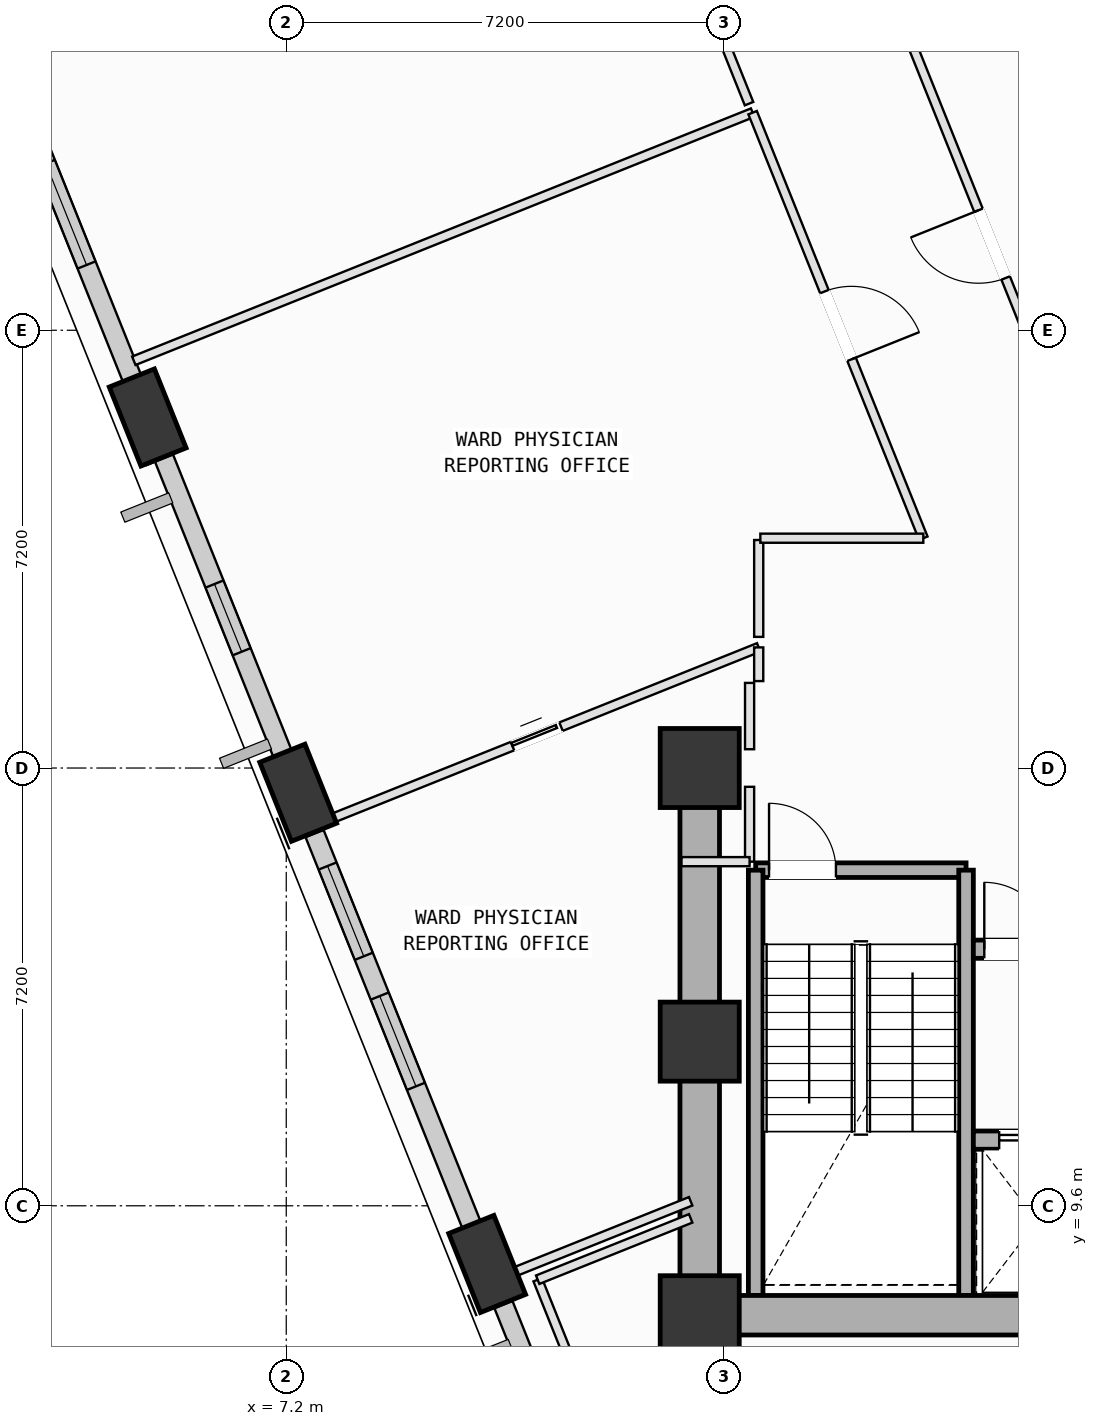
"""IFC4 building model, lengths in metres.
Left out: names, types, materials, properties, quantities, classifications, styles, units other than length and angle.
Written with IfcOpenShell. Run it as: python <this file> out.ifc"""

import sys

from ifc_helpers import new_model, si_unit, direction, frame, frame_2d, origin, origin_2d, place, context, subcontext, project, spatial, rectangle, extrude, element, fill, save


model = new_model("IFC4")
c1 = context("Model", 3, precision=1e-05, world=origin(), true_north=direction((0.0, 1.0)))
c2 = subcontext(c1, "Body", "Model", "MODEL_VIEW")
j1 = project(units=[si_unit("LENGTHUNIT", "METRE"), si_unit("PLANEANGLEUNIT", "RADIAN")], contexts=[c1])
p1 = place(None, origin())
s1 = spatial("IfcSite", under=j1, at=p1, CompositionType="ELEMENT")
p2 = place(p1, origin())
s2 = spatial("IfcBuilding", under=s1, at=p2, CompositionType="ELEMENT")
p3 = place(p2, frame((0.0, 0.0, 116.4)))
s3 = spatial("IfcBuildingStorey", under=s2, at=p3, CompositionType="ELEMENT", Elevation=116.4)
for number, where, z_axis, x_axis in (
    (1, (14.0, 7.8, 0.0), (0.0, 0.0, 1.0), (1.0, 0.0, 0.0)),
    (2, (14.0, 12.3, 0.0), (0.0, 0.0, 1.0), (1.0, 0.0, 0.0)),
    (3, (14.0, 16.8, 0.0), (0.0, 0.0, 1.0), (1.0, 0.0, 0.0)),
):
    element("IfcColumn", number, at=place(p3, frame(where, z_axis=z_axis, x_axis=x_axis)), inside=s3, PredefinedType="COLUMN", context=c2, shape_type="SweptSolid", body=[
        extrude(rectangle(XDim=1.3, YDim=1.3, at=origin_2d()), origin(), (0.0, 0.0, 1.0), 4.0),
    ])
p4 = place(p3, frame((4.921, 22.566, 0.002), z_axis=(0.010191079334, -0.117986007762, 0.992962961985), x_axis=(-0.450108088675, 0.886183267608, 0.109917808931)))
e4 = element("IfcColumn", 4, at=p4, inside=s3, PredefinedType="COLUMN", context=c2, shape_type="SweptSolid", body=[
    extrude(rectangle(XDim=1.4, YDim=0.8, at=origin_2d()), origin(), (0.0, 0.0, 1.0), 4.025),
])
p5 = place(p3, frame((7.396, 16.394, 0.002), z_axis=(0.035507833365, -0.107676745966, 0.993551665565), x_axis=(-0.642258011043, 0.759230004832, 0.105235198548)))
e5 = element("IfcColumn", 5, at=p5, inside=s3, PredefinedType="COLUMN", context=c2, shape_type="SweptSolid", body=[
    extrude(rectangle(XDim=1.4, YDim=0.8, at=origin_2d()), origin(), (0.0, 0.0, 1.0), 4.022),
])
p6 = place(p3, frame((10.504, 8.643, 0.002), z_axis=(0.067292325848, -0.094536919452, 0.993244438063), x_axis=(-0.837814695487, 0.535225411219, 0.107704666624)))
e6 = element("IfcColumn", 6, at=p6, inside=s3, PredefinedType="COLUMN", context=c2, shape_type="SweptSolid", body=[
    extrude(rectangle(XDim=1.4, YDim=0.8, at=origin_2d()), origin(), (0.0, 0.0, 1.0), 4.023),
])
p7 = place(p3, frame((4.823, 22.81, 0.0), z_axis=(0.0, 0.0, 1.0), x_axis=(-0.372175910941, 0.928162211747, 0.0)))
e7 = element("IfcWall", 7, at=p7, inside=s3, PredefinedType="SOLIDWALL", context=c2, shape_type="SweptSolid", body=[
    extrude(rectangle(XDim=5.628, YDim=0.32, at=frame_2d((2.814, 0.0))), origin(), (0.0, 0.0, 1.0), 3.165),
])
p8 = place(p7, frame((2.438, 0.0, 0.75)))
e8 = element("IfcOpeningElement", 8, at=p8, cuts=e7, PredefinedType="OPENING", context=c2, shape_type="SweptSolid", body=[
    extrude(rectangle(XDim=1.8, YDim=2.05, at=frame_2d((0.9, 1.025))), frame((0.0, 0.17, 0.0), z_axis=(0.0, -1.0, 0.0), x_axis=(1.0, 0.0, 0.0)), (0.0, 0.0, 1.0), 0.34),
])
p9 = place(p3, frame((7.296, 16.643, 0.0), z_axis=(0.0, 0.0, 1.0), x_axis=(-0.372178527246, 0.928161162653, 0.0)))
e9 = element("IfcWall", 9, at=p9, inside=s3, PredefinedType="SOLIDWALL", context=c2, shape_type="SweptSolid", body=[
    extrude(rectangle(XDim=5.662, YDim=0.32, at=frame_2d((2.831, 0.0))), origin(), (0.0, 0.0, 1.0), 3.165),
])
p10 = place(p9, frame((2.23, 0.0, 0.75)))
e10 = element("IfcOpeningElement", 10, at=p10, cuts=e9, PredefinedType="OPENING", context=c2, shape_type="SweptSolid", body=[
    extrude(rectangle(XDim=1.2, YDim=1.75, at=frame_2d((0.6, 0.875))), frame((0.0, 0.17, 0.0), z_axis=(0.0, -1.0, 0.0), x_axis=(1.0, 0.0, 0.0)), (0.0, 0.0, 1.0), 0.34),
])
p11 = place(p3, frame((10.405, 8.89, 0.0), z_axis=(0.0, 0.0, 1.0), x_axis=(-0.372168327293, 0.928165252614, 0.0)))
e11 = element("IfcWall", 11, at=p11, inside=s3, PredefinedType="SOLIDWALL", context=c2, shape_type="SweptSolid", body=[
    extrude(rectangle(XDim=7.36, YDim=0.32, at=frame_2d((3.68, 0.0))), origin(), (0.0, 0.0, 1.0), 3.165),
])
p12 = place(p11, frame((2.881, 0.0, 0.75)))
e12 = element("IfcOpeningElement", 12, at=p12, cuts=e11, PredefinedType="OPENING", context=c2, shape_type="SweptSolid", body=[
    extrude(rectangle(XDim=1.6, YDim=1.95, at=frame_2d((0.8, 0.975))), frame((0.0, 0.17, 0.0), z_axis=(0.0, -1.0, 0.0), x_axis=(1.0, 0.0, 0.0)), (0.0, 0.0, 1.0), 0.34),
])
p13 = place(p11, frame((5.186, 0.0, 0.75)))
e13 = element("IfcOpeningElement", 13, at=p13, cuts=e11, PredefinedType="OPENING", context=c2, shape_type="SweptSolid", body=[
    extrude(rectangle(XDim=1.6, YDim=1.95, at=frame_2d((0.8, 0.975))), frame((0.0, 0.17, 0.0), z_axis=(0.0, -1.0, 0.0), x_axis=(1.0, 0.0, 0.0)), (0.0, 0.0, 1.0), 0.34),
])
p14 = place(p3, frame((13.088, 2.198, 0.0), z_axis=(0.0, 0.0, 1.0), x_axis=(-0.372168368357, 0.928165236148, 0.0)))
e14 = element("IfcWall", 14, at=p14, inside=s3, PredefinedType="SOLIDWALL", context=c2, shape_type="SweptSolid", body=[
    extrude(rectangle(XDim=6.223, YDim=0.32, at=frame_2d((3.112, 0.0))), origin(), (0.0, 0.0, 1.0), 3.165),
])
p15 = place(p14, frame((2.114, 0.0, 0.75)))
e15 = element("IfcOpeningElement", 15, at=p15, cuts=e14, PredefinedType="OPENING", context=c2, shape_type="SweptSolid", body=[
    extrude(rectangle(XDim=2.0, YDim=1.95, at=frame_2d((1.0, 0.975))), frame((0.0, 0.17, 0.0), z_axis=(0.0, -1.0, 0.0), x_axis=(1.0, 0.0, 0.0)), (0.0, 0.0, 1.0), 0.34),
])
p16 = place(p3, frame((14.92, 15.12, 0.0), z_axis=(0.0, 0.0, 1.0), x_axis=(1.0, 0.0, 0.0)))
e16 = element("IfcWall", 16, at=p16, inside=s3, PredefinedType="SOLIDWALL", context=c2, shape_type="SweptSolid", body=[
    extrude(rectangle(XDim=3.46, YDim=0.24, at=frame_2d((1.73, 0.0))), origin(), (0.0, 0.0, 1.0), 3.78),
])
p17 = place(p16, frame((0.22, 0.0, 0.0)))
e17 = element("IfcOpeningElement", 17, at=p17, cuts=e16, PredefinedType="OPENING", context=c2, shape_type="SweptSolid", body=[
    extrude(rectangle(XDim=1.1, YDim=2.15, at=frame_2d((0.55, 1.075))), frame((0.0, 0.13, 0.0), z_axis=(0.0, -1.0, 0.0), x_axis=(1.0, 0.0, 0.0)), (0.0, 0.0, 1.0), 0.26),
])
for number, where, z_axis, x_axis in (
    (18, (18.38, 15.12, 0.0), (0.0, 0.0, 1.0), (0.0, -1.0, 0.0)),
    (19, (14.92, 8.125, 0.0), (0.0, 0.0, 1.0), (0.0, 1.0, 0.0)),
):
    element("IfcWall", number, at=place(p3, frame(where, z_axis=z_axis, x_axis=x_axis)), inside=s3, PredefinedType="SOLIDWALL", context=c2, shape_type="SweptSolid", body=[
        extrude(rectangle(XDim=6.995, YDim=0.24, at=frame_2d((3.498, 0.0))), origin(), (0.0, 0.0, 1.0), 3.78),
    ])
p18 = place(p3, frame((14.0, 7.8, 0.0), z_axis=(0.0, 0.0, 1.0), x_axis=(1.0, 0.0, 0.0)))
e20 = element("IfcWall", 20, at=p18, inside=s3, PredefinedType="SHEAR", context=c2, shape_type="SweptSolid", body=[
    extrude(rectangle(XDim=10.8, YDim=0.65, at=frame_2d((5.4, 0.0))), origin(), (0.0, 0.0, 1.0), 3.78),
])
p19 = place(p3, frame((14.0, 16.8, 0.0), z_axis=(0.0, 0.0, 1.0), x_axis=(0.0, -1.0, 0.0)))
e21 = element("IfcWall", 21, at=p19, inside=s3, PredefinedType="SHEAR", context=c2, shape_type="SweptSolid", body=[
    extrude(rectangle(XDim=9.0, YDim=0.65, at=frame_2d((4.5, 0.0))), origin(), (0.0, 0.0, 1.0), 3.78),
])
p20 = place(p3, frame((18.5, 10.68, 0.0), z_axis=(0.0, 0.0, 1.0), x_axis=(1.0, 0.0, 0.0)))
e22 = element("IfcWall", 22, at=p20, inside=s3, PredefinedType="SOLIDWALL", context=c2, shape_type="SweptSolid", body=[
    extrude(rectangle(XDim=5.3, YDim=0.3, at=frame_2d((2.65, 0.0))), origin(), (0.0, 0.0, 1.0), 3.78),
])
p21 = place(p20, frame((4.22, 0.0, 0.0)))
e23 = element("IfcOpeningElement", 23, at=p21, cuts=e22, PredefinedType="OPENING", context=c2, shape_type="SweptSolid", body=[
    extrude(rectangle(XDim=0.86, YDim=2.06, at=frame_2d((0.43, 1.03))), frame((0.0, 0.16, 0.0), z_axis=(0.0, -1.0, 0.0), x_axis=(1.0, 0.0, 0.0)), (0.0, 0.0, 1.0), 0.32),
])
p22 = place(p20, frame((0.425, 0.0, 0.0)))
e24 = element("IfcOpeningElement", 24, at=p22, cuts=e22, PredefinedType="OPENING", context=c2, shape_type="SweptSolid", body=[
    extrude(rectangle(XDim=1.25, YDim=2.18, at=frame_2d((0.625, 1.09))), frame((0.0, 0.16, 0.0), z_axis=(0.0, -1.0, 0.0), x_axis=(1.0, 0.0, 0.0)), (0.0, 0.0, 1.0), 0.32),
])
p23 = place(p20, frame((2.525, 0.0, 0.0)))
e25 = element("IfcOpeningElement", 25, at=p23, cuts=e22, PredefinedType="OPENING", context=c2, shape_type="SweptSolid", body=[
    extrude(rectangle(XDim=1.25, YDim=2.18, at=frame_2d((0.625, 1.09))), frame((0.0, 0.16, 0.0), z_axis=(0.0, -1.0, 0.0), x_axis=(1.0, 0.0, 0.0)), (0.0, 0.0, 1.0), 0.32),
])
p24 = place(p3, frame((18.5, 13.82, 0.0), z_axis=(0.0, 0.0, 1.0), x_axis=(1.0, 0.0, 0.0)))
e26 = element("IfcWall", 26, at=p24, inside=s3, PredefinedType="SOLIDWALL", context=c2, shape_type="SweptSolid", body=[
    extrude(rectangle(XDim=5.3, YDim=0.3, at=frame_2d((2.65, 0.0))), origin(), (0.0, 0.0, 1.0), 3.78),
])
p25 = place(p24, frame((0.18, 0.0, 0.0)))
e27 = element("IfcOpeningElement", 27, at=p25, cuts=e26, PredefinedType="OPENING", context=c2, shape_type="SweptSolid", body=[
    extrude(rectangle(XDim=1.1, YDim=2.15, at=frame_2d((0.55, 1.075))), frame((0.0, 0.16, 0.0), z_axis=(0.0, -1.0, 0.0), x_axis=(1.0, 0.0, 0.0)), (0.0, 0.0, 1.0), 0.32),
])
p26 = place(p3, frame((16.075, -3.435, 0.0), z_axis=(0.0, 0.0, 1.0), x_axis=(-0.372226827059, 0.928141793703, 0.0)))
e28 = element("IfcWall", 28, at=p26, inside=s3, PredefinedType="PARTITIONING", context=c2, shape_type="SweptSolid", body=[
    extrude(rectangle(XDim=12.734, YDim=0.15, at=frame_2d((6.367, 0.0))), origin(), (0.0, 0.0, 1.0), 3.165),
])
p27 = place(p3, frame((11.335, 8.384, 0.0), z_axis=(0.0, 0.0, 1.0), x_axis=(0.928147145325, 0.372213482595, 0.0)))
e29 = element("IfcWall", 29, at=p27, inside=s3, PredefinedType="PARTITIONING", context=c2, shape_type="SweptSolid", body=[
    extrude(rectangle(XDim=2.711, YDim=0.15, at=frame_2d((1.355, 0.0))), origin(), (0.0, 0.0, 1.0), 3.78),
])
p28 = place(p3, frame((14.82, 18.2, 0.0), z_axis=(0.0, 0.0, 1.0), x_axis=(0.0, -1.0, 0.0)))
e30 = element("IfcWall", 30, at=p28, inside=s3, PredefinedType="PARTITIONING", context=c2, shape_type="SweptSolid", body=[
    extrude(rectangle(XDim=1.091, YDim=0.15, at=frame_2d((0.545, 0.0))), origin(), (0.0, 0.0, 1.0), 3.78),
])
p29 = place(p3, frame((14.82, 16.491, 0.0), z_axis=(0.0, 0.0, 1.0), x_axis=(0.0, -1.0, 0.0)))
e31 = element("IfcWall", 31, at=p29, inside=s3, PredefinedType="PARTITIONING", context=c2, shape_type="SweptSolid", body=[
    extrude(rectangle(XDim=1.231, YDim=0.15, at=frame_2d((0.615, 0.0))), origin(), (0.0, 0.0, 1.0), 3.78),
])
p30 = place(p3, frame((14.82, 15.26, 0.0), z_axis=(0.0, 0.0, 1.0), x_axis=(-1.0, 0.0, 0.0)))
e32 = element("IfcWall", 32, at=p30, inside=s3, PredefinedType="PARTITIONING", context=c2, shape_type="SweptSolid", body=[
    extrude(rectangle(XDim=1.12, YDim=0.15, at=frame_2d((0.56, 0.0))), origin(), (0.0, 0.0, 1.0), 3.78),
])
p31 = place(p3, frame((13.851, 9.674, 0.0), z_axis=(0.0, 0.0, 1.0), x_axis=(-0.928127817915, -0.372261673574, 0.0)))
e33 = element("IfcWall", 33, at=p31, inside=s3, PredefinedType="PARTITIONING", context=c2, shape_type="SweptSolid", body=[
    extrude(rectangle(XDim=3.72, YDim=0.15, at=frame_2d((1.86, 0.0))), origin(), (0.0, 0.0, 1.0), 3.78),
])
p32 = place(p3, frame((10.398, 8.289, 0.0), z_axis=(0.0, 0.0, 1.0), x_axis=(-0.372450597791, 0.928052020204, 0.0)))
e34 = element("IfcWall", 34, at=p32, inside=s3, PredefinedType="PARTITIONING", context=c2, shape_type="SweptSolid", body=[
    extrude(rectangle(XDim=0.556, YDim=0.15, at=frame_2d((0.278, 0.0))), origin(), (0.0, 0.0, 1.0), 3.165),
])
p33 = place(p3, frame((7.67, 15.857, 0.0), z_axis=(0.0, 0.0, 1.0), x_axis=(0.928170242588, 0.372155882358, 0.0)))
e35 = element("IfcWall", 35, at=p33, inside=s3, PredefinedType="PARTITIONING", context=c2, shape_type="SweptSolid", body=[
    extrude(rectangle(XDim=7.865, YDim=0.15, at=frame_2d((3.933, 0.0))), origin(), (0.0, 0.0, 1.0), 3.78),
])
p34 = place(p33, frame((3.502, 0.0, 0.0)))
e36 = element("IfcOpeningElement", 36, at=p34, cuts=e35, PredefinedType="OPENING", context=c2, shape_type="SweptSolid", body=[
    extrude(rectangle(XDim=0.86, YDim=2.06, at=frame_2d((0.43, 1.03))), frame((0.0, 0.085, 0.0), z_axis=(0.0, -1.0, 0.0), x_axis=(1.0, 0.0, 0.0)), (0.0, 0.0, 1.0), 0.17),
])
p35 = place(p3, frame((14.97, 18.784, 0.0), z_axis=(0.0, 0.0, 1.0), x_axis=(0.0, -1.0, 0.0)))
e37 = element("IfcWall", 37, at=p35, inside=s3, PredefinedType="PARTITIONING", context=c2, shape_type="SweptSolid", body=[
    extrude(rectangle(XDim=0.554, YDim=0.15, at=frame_2d((0.277, 0.0))), origin(), (0.0, 0.0, 1.0), 3.78),
])
p36 = place(p3, frame((14.97, 20.55, 0.0), z_axis=(0.0, 0.0, 1.0), x_axis=(0.0, -1.0, 0.0)))
e38 = element("IfcWall", 38, at=p36, inside=s3, PredefinedType="PARTITIONING", context=c2, shape_type="SweptSolid", body=[
    extrude(rectangle(XDim=1.593, YDim=0.15, at=frame_2d((0.796, 0.0))), origin(), (0.0, 0.0, 1.0), 3.78),
])
p37 = place(p3, frame((7.347, 15.9, 0.0), z_axis=(0.0, 0.0, 1.0), x_axis=(-0.372757689905, 0.927928717422, 0.0)))
e39 = element("IfcWall", 39, at=p37, inside=s3, PredefinedType="PARTITIONING", context=c2, shape_type="SweptSolid", body=[
    extrude(rectangle(XDim=0.708, YDim=0.15, at=frame_2d((0.354, 0.0))), origin(), (0.0, 0.0, 1.0), 3.165),
])
p38 = place(p3, frame((4.976, 21.812, 0.0), z_axis=(0.0, 0.0, 1.0), x_axis=(-0.372032450778, 0.928219723755, 0.0)))
e40 = element("IfcWall", 40, at=p38, inside=s3, PredefinedType="PARTITIONING", context=c2, shape_type="SweptSolid", body=[
    extrude(rectangle(XDim=0.984, YDim=0.15, at=frame_2d((0.492, 0.0))), origin(), (0.0, 0.0, 1.0), 3.165),
])
p39 = place(p3, frame((4.693, 23.498, 0.0), z_axis=(0.0, 0.0, 1.0), x_axis=(0.928153869295, 0.372196715344, 0.0)))
e41 = element("IfcWall", 41, at=p39, inside=s3, PredefinedType="PARTITIONING", context=c2, shape_type="SweptSolid", body=[
    extrude(rectangle(XDim=10.965, YDim=0.15, at=frame_2d((5.482, 0.0))), origin(), (0.0, 0.0, 1.0), 3.78),
])
p40 = place(p3, frame((14.87, 27.579, 0.0), z_axis=(0.0, 0.0, 1.0), x_axis=(0.372222245283, -0.928143631189, 0.0)))
e42 = element("IfcWall", 42, at=p40, inside=s3, PredefinedType="PARTITIONING", context=c2, shape_type="SweptSolid", body=[
    extrude(rectangle(XDim=7.541, YDim=0.15, at=frame_2d((3.771, 0.0))), origin(), (0.0, 0.0, 1.0), 3.78),
])
p41 = place(p40, frame((3.17, 0.0, 0.0)))
e43 = element("IfcOpeningElement", 43, at=p41, cuts=e42, PredefinedType="OPENING", context=c2, shape_type="SweptSolid", body=[
    extrude(rectangle(XDim=1.2, YDim=2.15, at=frame_2d((0.6, 1.075))), frame((0.0, 0.085, 0.0), z_axis=(0.0, -1.0, 0.0), x_axis=(1.0, 0.0, 0.0)), (0.0, 0.0, 1.0), 0.17),
])
p42 = place(p3, frame((17.677, 20.58, 0.0), z_axis=(0.0, 0.0, 1.0), x_axis=(-1.0, 0.0, 0.0)))
e44 = element("IfcWall", 44, at=p42, inside=s3, PredefinedType="PARTITIONING", context=c2, shape_type="SweptSolid", body=[
    extrude(rectangle(XDim=2.68, YDim=0.15, at=frame_2d((1.34, 0.0))), origin(), (0.0, 0.0, 1.0), 3.78),
])
p43 = place(p3, frame((11.818, 35.19, 0.0), z_axis=(0.0, 0.0, 1.0), x_axis=(0.372222898555, -0.928143369201, 0.0)))
e45 = element("IfcWall", 45, at=p43, inside=s3, PredefinedType="PARTITIONING", context=c2, shape_type="SweptSolid", body=[
    extrude(rectangle(XDim=8.041, YDim=0.15, at=frame_2d((4.021, 0.0))), origin(), (0.0, 0.0, 1.0), 3.78),
])
p44 = place(p43, frame((3.42, 0.0, 0.0)))
e46 = element("IfcOpeningElement", 46, at=p44, cuts=e45, PredefinedType="OPENING", context=c2, shape_type="SweptSolid", body=[
    extrude(rectangle(XDim=1.2, YDim=2.15, at=frame_2d((0.6, 1.075))), frame((0.0, 0.085, 0.0), z_axis=(0.0, -1.0, 0.0), x_axis=(1.0, 0.0, 0.0)), (0.0, 0.0, 1.0), 0.17),
])
p45 = place(p3, frame((20.229, 21.873, 0.0), z_axis=(0.0, 0.0, 1.0), x_axis=(-0.372211937798, 0.928147764831, 0.0)))
e47 = element("IfcWall", 47, at=p45, inside=s3, PredefinedType="PARTITIONING", context=c2, shape_type="SweptSolid", body=[
    extrude(rectangle(XDim=7.635, YDim=0.15, at=frame_2d((3.818, 0.0))), origin(), (0.0, 0.0, 1.0), 3.78),
])
p46 = place(p45, frame((3.218, 0.0, 0.0)))
e48 = element("IfcOpeningElement", 48, at=p46, cuts=e47, PredefinedType="OPENING", context=c2, shape_type="SweptSolid", body=[
    extrude(rectangle(XDim=1.2, YDim=2.15, at=frame_2d((0.6, 1.075))), frame((0.0, 0.085, 0.0), z_axis=(0.0, -1.0, 0.0), x_axis=(1.0, 0.0, 0.0)), (0.0, 0.0, 1.0), 0.17),
])
p47 = place(p8, origin())
e49 = element("IfcWindow", 49, at=p47, inside=s3, PartitioningType="SINGLE_PANEL", PredefinedType="WINDOW", context=c2, shape_type="SweptSolid", body=[
    extrude(rectangle(XDim=1.8, YDim=2.05, at=frame_2d((0.9, 1.025))), frame((0.0, 0.03, 0.0), z_axis=(0.0, -1.0, 0.0), x_axis=(1.0, 0.0, 0.0)), (0.0, 0.0, 1.0), 0.06),
])
fill(e8, e49)
p48 = place(p10, origin())
e50 = element("IfcWindow", 50, at=p48, inside=s3, PartitioningType="SINGLE_PANEL", PredefinedType="WINDOW", context=c2, shape_type="SweptSolid", body=[
    extrude(rectangle(XDim=1.2, YDim=1.75, at=frame_2d((0.6, 0.875))), frame((0.0, 0.03, 0.0), z_axis=(0.0, -1.0, 0.0), x_axis=(1.0, 0.0, 0.0)), (0.0, 0.0, 1.0), 0.06),
])
fill(e10, e50)
p49 = place(p12, origin())
e51 = element("IfcWindow", 51, at=p49, inside=s3, PartitioningType="SINGLE_PANEL", PredefinedType="WINDOW", context=c2, shape_type="SweptSolid", body=[
    extrude(rectangle(XDim=1.6, YDim=1.95, at=frame_2d((0.8, 0.975))), frame((0.0, 0.03, 0.0), z_axis=(0.0, -1.0, 0.0), x_axis=(1.0, 0.0, 0.0)), (0.0, 0.0, 1.0), 0.06),
])
fill(e12, e51)
p50 = place(p13, origin())
e52 = element("IfcWindow", 52, at=p50, inside=s3, PartitioningType="SINGLE_PANEL", PredefinedType="WINDOW", context=c2, shape_type="SweptSolid", body=[
    extrude(rectangle(XDim=1.6, YDim=1.95, at=frame_2d((0.8, 0.975))), frame((0.0, 0.03, 0.0), z_axis=(0.0, -1.0, 0.0), x_axis=(1.0, 0.0, 0.0)), (0.0, 0.0, 1.0), 0.06),
])
fill(e13, e52)
p51 = place(p17, origin())
e53 = element("IfcDoor", 53, at=p51, inside=s3, OperationType="SINGLE_SWING_LEFT", PredefinedType="DOOR", context=c2, shape_type="SweptSolid", body=[
    extrude(rectangle(XDim=1.1, YDim=2.15, at=frame_2d((0.55, 1.075))), frame((0.0, 0.025, 0.0), z_axis=(0.0, -1.0, 0.0), x_axis=(1.0, 0.0, 0.0)), (0.0, 0.0, 1.0), 0.05),
])
fill(e17, e53)
p52 = place(p25, origin())
e54 = element("IfcDoor", 54, at=p52, inside=s3, OperationType="SINGLE_SWING_LEFT", PredefinedType="DOOR", context=c2, shape_type="SweptSolid", body=[
    extrude(rectangle(XDim=1.1, YDim=2.15, at=frame_2d((0.55, 1.075))), frame((0.0, 0.025, 0.0), z_axis=(0.0, -1.0, 0.0), x_axis=(1.0, 0.0, 0.0)), (0.0, 0.0, 1.0), 0.05),
])
fill(e27, e54)
p53 = place(p22, origin())
e55 = element("IfcDoor", 55, at=p53, inside=s3, OperationType="DOUBLE_DOOR_SLIDING", PredefinedType="DOOR", context=c2, shape_type="SweptSolid", body=[
    extrude(rectangle(XDim=1.25, YDim=2.18, at=frame_2d((0.625, 1.09))), frame((0.0, 0.025, 0.0), z_axis=(0.0, -1.0, 0.0), x_axis=(1.0, 0.0, 0.0)), (0.0, 0.0, 1.0), 0.05),
])
fill(e24, e55)
p54 = place(p41, origin())
e56 = element("IfcDoor", 56, at=p54, inside=s3, OperationType="SINGLE_SWING_RIGHT", PredefinedType="DOOR", context=c2, shape_type="SweptSolid", body=[
    extrude(rectangle(XDim=1.2, YDim=2.15, at=frame_2d((0.6, 1.075))), frame((0.0, 0.025, 0.0), z_axis=(0.0, -1.0, 0.0), x_axis=(1.0, 0.0, 0.0)), (0.0, 0.0, 1.0), 0.05),
])
fill(e43, e56)
p55 = place(p46, origin())
e57 = element("IfcDoor", 57, at=p55, inside=s3, OperationType="SINGLE_SWING_RIGHT", PredefinedType="DOOR", context=c2, shape_type="SweptSolid", body=[
    extrude(rectangle(XDim=1.2, YDim=2.15, at=frame_2d((0.6, 1.075))), frame((0.0, 0.025, 0.0), z_axis=(0.0, -1.0, 0.0), x_axis=(1.0, 0.0, 0.0)), (0.0, 0.0, 1.0), 0.05),
])
fill(e48, e57)
p56 = place(p34, origin())
e58 = element("IfcDoor", 58, at=p56, inside=s3, OperationType="SLIDING_TO_LEFT", PredefinedType="DOOR", context=c2, shape_type="SweptSolid", body=[
    extrude(rectangle(XDim=0.86, YDim=2.06, at=frame_2d((0.43, 1.03))), frame((0.0, 0.025, 0.0), z_axis=(0.0, -1.0, 0.0), x_axis=(1.0, 0.0, 0.0)), (0.0, 0.0, 1.0), 0.05),
])
fill(e36, e58)
save(model, sys.argv[1])
